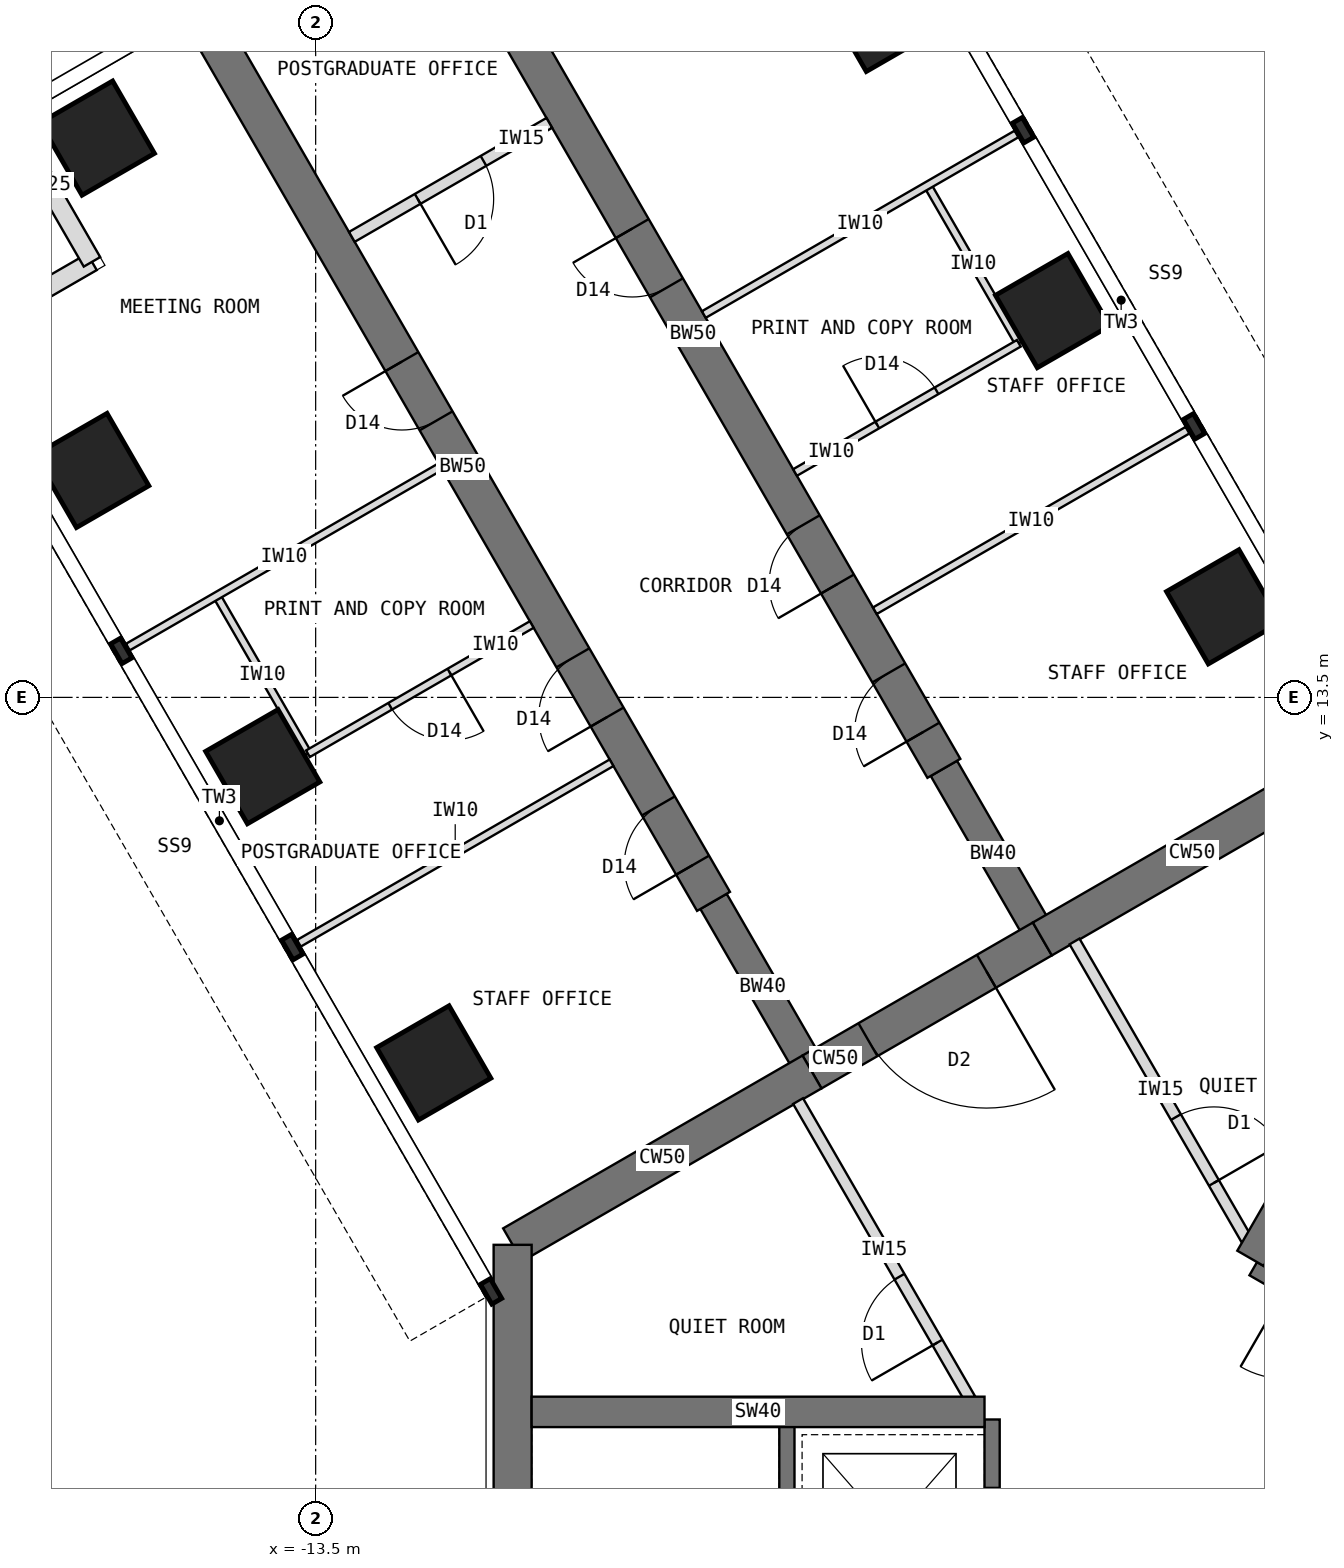
"""IFC4 building model, lengths in metres.
Left out: names, types, materials, properties, quantities, classifications, styles, units other than length and angle.
Written with IfcOpenShell. Run it as: python <this file> out.ifc"""

import sys

from ifc_helpers import new_model, si_unit, direction, frame, frame_2d, origin, origin_2d, place, context, subcontext, project, spatial, rectangle, extrude, element, fill, save


model = new_model("IFC4")
c1 = context("Model", 3, precision=1e-05, world=origin(), true_north=direction((0.0, 1.0)))
c2 = subcontext(c1, "Body", "Model", "MODEL_VIEW")
j1 = project(units=[si_unit("LENGTHUNIT", "METRE"), si_unit("PLANEANGLEUNIT", "RADIAN")], contexts=[c1])
p1 = place(None, origin())
s1 = spatial("IfcSite", under=j1, at=p1, CompositionType="ELEMENT")
p2 = place(p1, origin())
s2 = spatial("IfcBuilding", under=s1, at=p2, CompositionType="ELEMENT")
p3 = place(p2, frame((0.0, 0.0, 230.5)))
s3 = spatial("IfcBuildingStorey", under=s2, at=p3, CompositionType="ELEMENT", Elevation=230.5)
p4 = place(p3, frame((0.0, 12.596, 0.0), z_axis=(0.0, 0.0, 1.0), x_axis=(-0.866011268655, -0.500024481964, 0.0)))
e1 = element("IfcWall", 1, at=p4, inside=s3, PredefinedType="SHEAR", context=c2, shape_type="SweptSolid", body=[
    extrude(rectangle(XDim=4.548, YDim=0.5, at=frame_2d((2.274, 0.0))), origin(), (0.0, 0.0, 1.0), 4.0),
])
p5 = place(p3, frame((-3.939, 10.322, 0.0), z_axis=(0.0, 0.0, 1.0), x_axis=(-0.866019471182, -0.500010275428, 0.0)))
e2 = element("IfcWall", 2, at=p5, inside=s3, PredefinedType="SHEAR", context=c2, shape_type="SweptSolid", body=[
    extrude(rectangle(XDim=3.5, YDim=0.5, at=frame_2d((1.75, 0.0))), origin(), (0.0, 0.0, 1.0), 4.0),
])
p6 = place(p5, frame((0.85, 0.0, 0.0)))
e3 = element("IfcOpeningElement", 3, at=p6, cuts=e2, PredefinedType="OPENING", context=c2, shape_type="SweptSolid", body=[
    extrude(rectangle(XDim=1.8, YDim=2.1, at=frame_2d((0.9, 1.05))), frame((0.0, 0.26, 0.0), z_axis=(0.0, -1.0, 0.0), x_axis=(1.0, 0.0, 0.0)), (0.0, 0.0, 1.0), 0.52),
])
p7 = place(p3, frame((-6.97, 8.572, 0.0), z_axis=(0.0, 0.0, 1.0), x_axis=(-0.866034513004, -0.499984222037, 0.0)))
e4 = element("IfcWall", 4, at=p7, inside=s3, PredefinedType="SHEAR", context=c2, shape_type="SweptSolid", body=[
    extrude(rectangle(XDim=4.548, YDim=0.5, at=frame_2d((2.274, 0.0))), origin(), (0.0, 0.0, 1.0), 4.0),
])
p8 = place(p3, frame((-10.908, 6.298, 0.0), z_axis=(0.0, 0.0, 1.0), x_axis=(0.0, -1.0, 0.0)))
e5 = element("IfcWall", 5, at=p8, inside=s3, PredefinedType="SHEAR", context=c2, shape_type="SweptSolid", body=[
    extrude(rectangle(XDim=12.596, YDim=0.5, at=frame_2d((6.298, 0.0))), origin(), (0.0, 0.0, 1.0), 4.0),
])
p9 = place(p3, frame((-6.97, 8.572, 0.0), z_axis=(0.0, 0.0, 1.0), x_axis=(-0.499988811324, 0.866031863473, 0.0)))
e6 = element("IfcWall", 6, at=p9, inside=s3, PredefinedType="SHEAR", context=c2, shape_type="SweptSolid", body=[
    extrude(rectangle(XDim=2.592, YDim=0.4, at=frame_2d((1.296, 0.0))), origin(), (0.0, 0.0, 1.0), 4.0),
])
p10 = place(p3, frame((-8.266, 10.816, 0.0), z_axis=(0.0, 0.0, 1.0), x_axis=(-0.499996231654, 0.866027579429, 0.0)))
e7 = element("IfcWall", 7, at=p10, inside=s3, PredefinedType="SHEAR", context=c2, shape_type="SweptSolid", body=[
    extrude(rectangle(XDim=13.2, YDim=0.5, at=frame_2d((6.6, 0.0))), origin(), (0.0, 0.0, 1.0), 4.0),
])
p11 = place(p10, frame((0.55, 0.0, 0.0)))
e8 = element("IfcOpeningElement", 8, at=p11, cuts=e7, PredefinedType="OPENING", context=c2, shape_type="SweptSolid", body=[
    extrude(rectangle(XDim=0.9, YDim=2.1, at=frame_2d((0.45, 1.05))), frame((0.0, 0.26, 0.0), z_axis=(0.0, -1.0, 0.0), x_axis=(1.0, 0.0, 0.0)), (0.0, 0.0, 1.0), 0.52),
])
p12 = place(p10, frame((2.8, 0.0, 0.0)))
e9 = element("IfcOpeningElement", 9, at=p12, cuts=e7, PredefinedType="OPENING", context=c2, shape_type="SweptSolid", body=[
    extrude(rectangle(XDim=0.9, YDim=2.1, at=frame_2d((0.45, 1.05))), frame((0.0, 0.26, 0.0), z_axis=(0.0, -1.0, 0.0), x_axis=(1.0, 0.0, 0.0)), (0.0, 0.0, 1.0), 0.52),
])
p13 = place(p10, frame((7.3, 0.0, 0.0)))
e10 = element("IfcOpeningElement", 10, at=p13, cuts=e7, PredefinedType="OPENING", context=c2, shape_type="SweptSolid", body=[
    extrude(rectangle(XDim=0.9, YDim=2.1, at=frame_2d((0.45, 1.05))), frame((0.0, 0.26, 0.0), z_axis=(0.0, -1.0, 0.0), x_axis=(1.0, 0.0, 0.0)), (0.0, 0.0, 1.0), 0.52),
])
p14 = place(p3, frame((-3.939, 10.322, 0.0), z_axis=(0.0, 0.0, 1.0), x_axis=(-0.499918158782, 0.866072649678, 0.0)))
e11 = element("IfcWall", 11, at=p14, inside=s3, PredefinedType="SHEAR", context=c2, shape_type="SweptSolid", body=[
    extrude(rectangle(XDim=2.592, YDim=0.4, at=frame_2d((1.296, 0.0))), origin(), (0.0, 0.0, 1.0), 4.0),
])
p15 = place(p3, frame((-5.234, 12.566, 0.0), z_axis=(0.0, 0.0, 1.0), x_axis=(-0.500010103361, 0.866019570528, 0.0)))
e12 = element("IfcWall", 12, at=p15, inside=s3, PredefinedType="SHEAR", context=c2, shape_type="SweptSolid", body=[
    extrude(rectangle(XDim=13.2, YDim=0.5, at=frame_2d((6.6, 0.0))), origin(), (0.0, 0.0, 1.0), 4.0),
])
p16 = place(p15, frame((0.55, 0.0, 0.0)))
e13 = element("IfcOpeningElement", 13, at=p16, cuts=e12, PredefinedType="OPENING", context=c2, shape_type="SweptSolid", body=[
    extrude(rectangle(XDim=0.9, YDim=2.1, at=frame_2d((0.45, 1.05))), frame((0.0, 0.26, 0.0), z_axis=(0.0, -1.0, 0.0), x_axis=(1.0, 0.0, 0.0)), (0.0, 0.0, 1.0), 0.52),
])
p17 = place(p15, frame((2.8, 0.0, 0.0)))
e14 = element("IfcOpeningElement", 14, at=p17, cuts=e12, PredefinedType="OPENING", context=c2, shape_type="SweptSolid", body=[
    extrude(rectangle(XDim=0.9, YDim=2.1, at=frame_2d((0.45, 1.05))), frame((0.0, 0.26, 0.0), z_axis=(0.0, -1.0, 0.0), x_axis=(1.0, 0.0, 0.0)), (0.0, 0.0, 1.0), 0.52),
])
p18 = place(p15, frame((7.3, 0.0, 0.0)))
e15 = element("IfcOpeningElement", 15, at=p18, cuts=e12, PredefinedType="OPENING", context=c2, shape_type="SweptSolid", body=[
    extrude(rectangle(XDim=0.9, YDim=2.1, at=frame_2d((0.45, 1.05))), frame((0.0, 0.26, 0.0), z_axis=(0.0, -1.0, 0.0), x_axis=(1.0, 0.0, 0.0)), (0.0, 0.0, 1.0), 0.52),
])
for number, where, z_axis, x_axis in (
    (16, (-11.946, 8.691, 0.0), (0.0, 0.0, 1.0), (0.866, 0.5, 0.0)),
    (17, (-1.554, 14.691, 0.0), (0.0, 0.0, 1.0), (0.866, 0.5, 0.0)),
    (18, (-14.196, 12.588, 0.0), (0.0, 0.0, 1.0), (0.866, 0.5, 0.0)),
    (19, (-3.804, 18.588, 0.0), (0.0, 0.0, 1.0), (0.866, 0.5, 0.0)),
    (20, (-16.446, 16.486, 0.0), (0.0, 0.0, 1.0), (0.866, 0.5, 0.0)),
    (21, (-6.054, 22.486, 0.0), (0.0, 0.0, 1.0), (0.866, 0.5, 0.0)),
    (22, (-16.373, 20.858, 0.0), (0.0, 0.0, 1.0), (0.866, 0.5, 0.0)),
):
    element("IfcColumn", number, at=place(p3, frame(where, z_axis=z_axis, x_axis=x_axis)), inside=s3, PredefinedType="COLUMN", context=c2, shape_type="SweptSolid", body=[
        extrude(rectangle(XDim=1.1, YDim=1.1, at=origin_2d()), origin(), (0.0, 0.0, 1.0), 4.0),
    ])
for number, where, z_axis, x_axis in (
    (23, (-18.456, 18.067, 0.0), (0.0, 0.0, 1.0), (0.866, 0.5, 0.0)),
    (24, (-16.443, 19.23, 0.0), (0.0, 0.0, 1.0), (-0.5, 0.866, 0.0)),
):
    element("IfcWall", number, at=place(p3, frame(where, z_axis=z_axis, x_axis=x_axis)), inside=s3, PredefinedType="STANDARD", context=c2, shape_type="SweptSolid", body=[
        extrude(rectangle(XDim=2.325, YDim=0.25, at=frame_2d((1.163, 0.0))), origin(), (0.0, 0.0, 1.0), 3.8),
    ])
p19 = place(p3, frame((5.764, 1.984, 0.0), z_axis=(0.0, 0.0, 1.0), x_axis=(-0.866026010844, 0.49999894854, 0.0)))
e25 = element("IfcWall", 25, at=p19, inside=s3, PredefinedType="SHEAR", context=c2, shape_type="SweptSolid", body=[
    extrude(rectangle(XDim=8.0, YDim=0.2, at=frame_2d((4.0, 0.0))), origin(), (0.0, 0.0, 1.0), 4.0),
])
p20 = place(p19, frame((6.3, 0.0, 0.0)))
e26 = element("IfcOpeningElement", 26, at=p20, cuts=e25, PredefinedType="OPENING", context=c2, shape_type="SweptSolid", body=[
    extrude(rectangle(XDim=1.2, YDim=2.1, at=frame_2d((0.6, 1.05))), frame((0.0, 0.11, 0.0), z_axis=(0.0, -1.0, 0.0), x_axis=(1.0, 0.0, 0.0)), (0.0, 0.0, 1.0), 0.22),
])
p21 = place(p3, frame((-1.201, 6.12, 0.0), z_axis=(0.0, 0.0, 1.0), x_axis=(0.500021575205, 0.866012946976, 0.0)))
e27 = element("IfcWall", 27, at=p21, inside=s3, PredefinedType="SHEAR", context=c2, shape_type="SweptSolid", body=[
    extrude(rectangle(XDim=5.958, YDim=0.4, at=frame_2d((2.979, 0.0))), origin(), (0.0, 0.0, 1.0), 4.0),
])
p22 = place(p3, frame((-4.6, 4.0, 0.0), z_axis=(0.0, 0.0, 1.0), x_axis=(0.0, -1.0, 0.0)))
e28 = element("IfcWall", 28, at=p22, inside=s3, PredefinedType="SHEAR", context=c2, shape_type="SweptSolid", body=[
    extrude(rectangle(XDim=8.0, YDim=0.2, at=frame_2d((4.0, 0.0))), origin(), (0.0, 0.0, 1.0), 4.0),
])
p23 = place(p22, frame((6.3, 0.0, 0.0)))
e29 = element("IfcOpeningElement", 29, at=p23, cuts=e28, PredefinedType="OPENING", context=c2, shape_type="SweptSolid", body=[
    extrude(rectangle(XDim=1.2, YDim=2.1, at=frame_2d((0.6, 1.05))), frame((0.0, 0.11, 0.0), z_axis=(0.0, -1.0, 0.0), x_axis=(1.0, 0.0, 0.0)), (0.0, 0.0, 1.0), 0.22),
])
p24 = place(p22, frame((0.9, 0.0, 0.0)))
e30 = element("IfcOpeningElement", 30, at=p24, cuts=e28, PredefinedType="OPENING", context=c2, shape_type="SweptSolid", body=[
    extrude(rectangle(XDim=1.1, YDim=2.2, at=frame_2d((0.55, 1.1))), frame((0.0, 0.11, 0.0), z_axis=(0.0, -1.0, 0.0), x_axis=(1.0, 0.0, 0.0)), (0.0, 0.0, 1.0), 0.22),
])
p25 = place(p3, frame((-7.3, 4.0, 0.0), z_axis=(0.0, 0.0, 1.0), x_axis=(0.0, -1.0, 0.0)))
e31 = element("IfcWall", 31, at=p25, inside=s3, PredefinedType="SHEAR", context=c2, shape_type="SweptSolid", body=[
    extrude(rectangle(XDim=8.0, YDim=0.2, at=frame_2d((4.0, 0.0))), origin(), (0.0, 0.0, 1.0), 4.0),
])
p26 = place(p25, frame((6.7, 0.0, 0.0)))
e32 = element("IfcOpeningElement", 32, at=p26, cuts=e31, PredefinedType="OPENING", context=c2, shape_type="SweptSolid", body=[
    extrude(rectangle(XDim=1.1, YDim=2.1, at=frame_2d((0.55, 1.05))), frame((0.0, 0.11, 0.0), z_axis=(0.0, -1.0, 0.0), x_axis=(1.0, 0.0, 0.0)), (0.0, 0.0, 1.0), 0.22),
])
p27 = place(p3, frame((-4.7, 4.1, 0.0), z_axis=(0.0, 0.0, 1.0), x_axis=(-1.0, 0.0, 0.0)))
e33 = element("IfcWall", 33, at=p27, inside=s3, PredefinedType="SHEAR", context=c2, shape_type="SweptSolid", body=[
    extrude(rectangle(XDim=5.958, YDim=0.4, at=frame_2d((2.979, 0.0))), origin(), (0.0, 0.0, 1.0), 4.0),
])
for number, where, z_axis, x_axis in (
    (34, (-9.607, 12.64, 0.0), (0.0, 0.0, 1.0), (-0.866, -0.5, 0.0)),
    (35, (-11.857, 16.537, 0.0), (0.0, 0.0, 1.0), (-0.866, -0.5, 0.0)),
):
    element("IfcWall", number, at=place(p3, frame(where, z_axis=z_axis, x_axis=x_axis)), inside=s3, PredefinedType="PARTITIONING", context=c2, shape_type="SweptSolid", body=[
        extrude(rectangle(XDim=4.75, YDim=0.1, at=frame_2d((2.375, 0.0))), origin(), (0.0, 0.0, 1.0), 3.8),
    ])
p28 = place(p3, frame((-13.602, 12.759, 0.0), z_axis=(0.0, 0.0, 1.0), x_axis=(-0.500001309137, 0.866024647952, 0.0)))
e36 = element("IfcWall", 36, at=p28, inside=s3, PredefinedType="PARTITIONING", context=c2, shape_type="SweptSolid", body=[
    extrude(rectangle(XDim=2.4, YDim=0.1, at=frame_2d((1.2, 0.0))), origin(), (0.0, 0.0, 1.0), 3.8),
])
p29 = place(p3, frame((-10.657, 14.458, 0.0), z_axis=(0.0, 0.0, 1.0), x_axis=(-0.866038511948, -0.499977295307, 0.0)))
e37 = element("IfcWall", 37, at=p29, inside=s3, PredefinedType="PARTITIONING", context=c2, shape_type="SweptSolid", body=[
    extrude(rectangle(XDim=3.4, YDim=0.1, at=frame_2d((1.7, 0.0))), origin(), (0.0, 0.0, 1.0), 3.8),
])
p30 = place(p29, frame((1.25, 0.0, 0.0)))
e38 = element("IfcOpeningElement", 38, at=p30, cuts=e37, PredefinedType="OPENING", context=c2, shape_type="SweptSolid", body=[
    extrude(rectangle(XDim=0.9, YDim=2.1, at=frame_2d((0.45, 1.05))), frame((0.0, 0.06, 0.0), z_axis=(0.0, -1.0, 0.0), x_axis=(1.0, 0.0, 0.0)), (0.0, 0.0, 1.0), 0.12),
])
for number, where, z_axis, x_axis in (
    (39, (-6.143, 14.64, 0.0), (0.0, 0.0, 1.0), (0.866, 0.5, 0.0)),
    (40, (-8.393, 18.537, 0.0), (0.0, 0.0, 1.0), (0.866, 0.5, 0.0)),
):
    element("IfcWall", number, at=place(p3, frame(where, z_axis=z_axis, x_axis=x_axis)), inside=s3, PredefinedType="PARTITIONING", context=c2, shape_type="SweptSolid", body=[
        extrude(rectangle(XDim=4.75, YDim=0.1, at=frame_2d((2.375, 0.0))), origin(), (0.0, 0.0, 1.0), 3.8),
    ])
p31 = place(p3, frame((-4.249, 18.158, 0.0), z_axis=(0.0, 0.0, 1.0), x_axis=(-0.499957262057, 0.866050077142, 0.0)))
e41 = element("IfcWall", 41, at=p31, inside=s3, PredefinedType="PARTITIONING", context=c2, shape_type="SweptSolid", body=[
    extrude(rectangle(XDim=2.4, YDim=0.1, at=frame_2d((1.2, 0.0))), origin(), (0.0, 0.0, 1.0), 3.8),
])
p32 = place(p3, frame((-7.193, 16.458, 0.0), z_axis=(0.0, 0.0, 1.0), x_axis=(0.866020560687, 0.500008388397, 0.0)))
e42 = element("IfcWall", 42, at=p32, inside=s3, PredefinedType="PARTITIONING", context=c2, shape_type="SweptSolid", body=[
    extrude(rectangle(XDim=3.4, YDim=0.1, at=frame_2d((1.7, 0.0))), origin(), (0.0, 0.0, 1.0), 3.8),
])
p33 = place(p32, frame((1.25, 0.0, 0.0)))
e43 = element("IfcOpeningElement", 43, at=p33, cuts=e42, PredefinedType="OPENING", context=c2, shape_type="SweptSolid", body=[
    extrude(rectangle(XDim=0.9, YDim=2.1, at=frame_2d((0.45, 1.05))), frame((0.0, 0.06, 0.0), z_axis=(0.0, -1.0, 0.0), x_axis=(1.0, 0.0, 0.0)), (0.0, 0.0, 1.0), 0.12),
])
p34 = place(p3, frame((-4.89, 4.27, 0.0), z_axis=(0.0, 0.0, 1.0), x_axis=(-0.500032211057, 0.866006805923, 0.0)))
e44 = element("IfcWall", 44, at=p34, inside=s3, PredefinedType="PARTITIONING", context=c2, shape_type="SweptSolid", body=[
    extrude(rectangle(XDim=4.526, YDim=0.15, at=frame_2d((2.263, 0.0))), origin(), (0.0, 0.0, 1.0), 3.8),
])
p35 = place(p34, frame((0.858, 0.0, 0.0)))
e45 = element("IfcOpeningElement", 45, at=p35, cuts=e44, PredefinedType="OPENING", context=c2, shape_type="SweptSolid", body=[
    extrude(rectangle(XDim=1.0, YDim=2.1, at=frame_2d((0.5, 1.05))), frame((0.0, 0.085, 0.0), z_axis=(0.0, -1.0, 0.0), x_axis=(1.0, 0.0, 0.0)), (0.0, 0.0, 1.0), 0.17),
])
p36 = place(p3, frame((-3.515, 10.289, 0.0), z_axis=(0.0, 0.0, 1.0), x_axis=(0.499968392031, -0.866043651885, 0.0)))
e46 = element("IfcWall", 46, at=p36, inside=s3, PredefinedType="PARTITIONING", context=c2, shape_type="SweptSolid", body=[
    extrude(rectangle(XDim=4.526, YDim=0.15, at=frame_2d((2.263, 0.0))), origin(), (0.0, 0.0, 1.0), 3.8),
])
p37 = place(p36, frame((2.668, 0.0, 0.0)))
e47 = element("IfcOpeningElement", 47, at=p37, cuts=e46, PredefinedType="OPENING", context=c2, shape_type="SweptSolid", body=[
    extrude(rectangle(XDim=1.0, YDim=2.1, at=frame_2d((0.5, 1.05))), frame((0.0, 0.085, 0.0), z_axis=(0.0, -1.0, 0.0), x_axis=(1.0, 0.0, 0.0)), (0.0, 0.0, 1.0), 0.17),
])
p38 = place(p3, frame((-10.426, 21.058, 0.0), z_axis=(0.0, 0.0, 1.0), x_axis=(-0.866010750942, -0.50002537861, 0.0)))
e48 = element("IfcWall", 48, at=p38, inside=s3, PredefinedType="PARTITIONING", context=c2, shape_type="SweptSolid", body=[
    extrude(rectangle(XDim=3.0, YDim=0.15, at=frame_2d((1.5, 0.0))), origin(), (0.0, 0.0, 1.0), 3.8),
])
p39 = place(p38, frame((1.0, 0.0, 0.0)))
e49 = element("IfcOpeningElement", 49, at=p39, cuts=e48, PredefinedType="OPENING", context=c2, shape_type="SweptSolid", body=[
    extrude(rectangle(XDim=1.0, YDim=2.1, at=frame_2d((0.5, 1.05))), frame((0.0, 0.085, 0.0), z_axis=(0.0, -1.0, 0.0), x_axis=(1.0, 0.0, 0.0)), (0.0, 0.0, 1.0), 0.17),
])
p40 = place(p6, origin())
e50 = element("IfcDoor", 50, at=p40, inside=s3, OperationType="DOUBLE_DOOR_DOUBLE_SWING", PredefinedType="DOOR", context=c2, shape_type="SweptSolid", body=[
    extrude(rectangle(XDim=1.8, YDim=2.1, at=frame_2d((0.9, 1.05))), frame((0.0, 0.025, 0.0), z_axis=(0.0, -1.0, 0.0), x_axis=(1.0, 0.0, 0.0)), (0.0, 0.0, 1.0), 0.05),
])
fill(e3, e50)
p41 = place(p30, origin())
e51 = element("IfcDoor", 51, at=p41, inside=s3, OperationType="SINGLE_SWING_LEFT", PredefinedType="DOOR", context=c2, shape_type="SweptSolid", body=[
    extrude(rectangle(XDim=0.9, YDim=2.1, at=frame_2d((0.45, 1.05))), frame((0.0, 0.025, 0.0), z_axis=(0.0, -1.0, 0.0), x_axis=(1.0, 0.0, 0.0)), (0.0, 0.0, 1.0), 0.05),
])
fill(e38, e51)
p42 = place(p33, origin())
e52 = element("IfcDoor", 52, at=p42, inside=s3, OperationType="SINGLE_SWING_LEFT", PredefinedType="DOOR", context=c2, shape_type="SweptSolid", body=[
    extrude(rectangle(XDim=0.9, YDim=2.1, at=frame_2d((0.45, 1.05))), frame((0.0, 0.025, 0.0), z_axis=(0.0, -1.0, 0.0), x_axis=(1.0, 0.0, 0.0)), (0.0, 0.0, 1.0), 0.05),
])
fill(e43, e52)
p43 = place(p37, origin())
e53 = element("IfcDoor", 53, at=p43, inside=s3, OperationType="SINGLE_SWING_RIGHT", PredefinedType="DOOR", context=c2, shape_type="SweptSolid", body=[
    extrude(rectangle(XDim=1.0, YDim=2.1, at=frame_2d((0.5, 1.05))), frame((0.0, 0.025, 0.0), z_axis=(0.0, -1.0, 0.0), x_axis=(1.0, 0.0, 0.0)), (0.0, 0.0, 1.0), 0.05),
])
fill(e47, e53)
p44 = place(p35, origin())
e54 = element("IfcDoor", 54, at=p44, inside=s3, OperationType="SINGLE_SWING_LEFT", PredefinedType="DOOR", context=c2, shape_type="SweptSolid", body=[
    extrude(rectangle(XDim=1.0, YDim=2.1, at=frame_2d((0.5, 1.05))), frame((0.0, 0.025, 0.0), z_axis=(0.0, -1.0, 0.0), x_axis=(1.0, 0.0, 0.0)), (0.0, 0.0, 1.0), 0.05),
])
fill(e45, e54)
p45 = place(p39, origin())
e55 = element("IfcDoor", 55, at=p45, inside=s3, OperationType="SINGLE_SWING_RIGHT", PredefinedType="DOOR", context=c2, shape_type="SweptSolid", body=[
    extrude(rectangle(XDim=1.0, YDim=2.1, at=frame_2d((0.5, 1.05))), frame((0.0, 0.025, 0.0), z_axis=(0.0, -1.0, 0.0), x_axis=(1.0, 0.0, 0.0)), (0.0, 0.0, 1.0), 0.05),
])
fill(e49, e55)
p46 = place(p11, origin())
e56 = element("IfcDoor", 56, at=p46, inside=s3, OperationType="SINGLE_SWING_LEFT", PredefinedType="DOOR", context=c2, shape_type="SweptSolid", body=[
    extrude(rectangle(XDim=0.9, YDim=2.1, at=frame_2d((0.45, 1.05))), frame((0.0, 0.025, 0.0), z_axis=(0.0, -1.0, 0.0), x_axis=(1.0, 0.0, 0.0)), (0.0, 0.0, 1.0), 0.05),
])
fill(e8, e56)
p47 = place(p12, origin())
e57 = element("IfcDoor", 57, at=p47, inside=s3, OperationType="SINGLE_SWING_LEFT", PredefinedType="DOOR", context=c2, shape_type="SweptSolid", body=[
    extrude(rectangle(XDim=0.9, YDim=2.1, at=frame_2d((0.45, 1.05))), frame((0.0, 0.025, 0.0), z_axis=(0.0, -1.0, 0.0), x_axis=(1.0, 0.0, 0.0)), (0.0, 0.0, 1.0), 0.05),
])
fill(e9, e57)
p48 = place(p13, origin())
e58 = element("IfcDoor", 58, at=p48, inside=s3, OperationType="SINGLE_SWING_RIGHT", PredefinedType="DOOR", context=c2, shape_type="SweptSolid", body=[
    extrude(rectangle(XDim=0.9, YDim=2.1, at=frame_2d((0.45, 1.05))), frame((0.0, 0.025, 0.0), z_axis=(0.0, -1.0, 0.0), x_axis=(1.0, 0.0, 0.0)), (0.0, 0.0, 1.0), 0.05),
])
fill(e10, e58)
p49 = place(p16, origin())
e59 = element("IfcDoor", 59, at=p49, inside=s3, OperationType="SINGLE_SWING_LEFT", PredefinedType="DOOR", context=c2, shape_type="SweptSolid", body=[
    extrude(rectangle(XDim=0.9, YDim=2.1, at=frame_2d((0.45, 1.05))), frame((0.0, 0.025, 0.0), z_axis=(0.0, -1.0, 0.0), x_axis=(1.0, 0.0, 0.0)), (0.0, 0.0, 1.0), 0.05),
])
fill(e13, e59)
p50 = place(p17, origin())
e60 = element("IfcDoor", 60, at=p50, inside=s3, OperationType="SINGLE_SWING_LEFT", PredefinedType="DOOR", context=c2, shape_type="SweptSolid", body=[
    extrude(rectangle(XDim=0.9, YDim=2.1, at=frame_2d((0.45, 1.05))), frame((0.0, 0.025, 0.0), z_axis=(0.0, -1.0, 0.0), x_axis=(1.0, 0.0, 0.0)), (0.0, 0.0, 1.0), 0.05),
])
fill(e14, e60)
p51 = place(p18, origin())
e61 = element("IfcDoor", 61, at=p51, inside=s3, OperationType="SINGLE_SWING_RIGHT", PredefinedType="DOOR", context=c2, shape_type="SweptSolid", body=[
    extrude(rectangle(XDim=0.9, YDim=2.1, at=frame_2d((0.45, 1.05))), frame((0.0, 0.025, 0.0), z_axis=(0.0, -1.0, 0.0), x_axis=(1.0, 0.0, 0.0)), (0.0, 0.0, 1.0), 0.05),
])
fill(e15, e61)
save(model, sys.argv[1])
